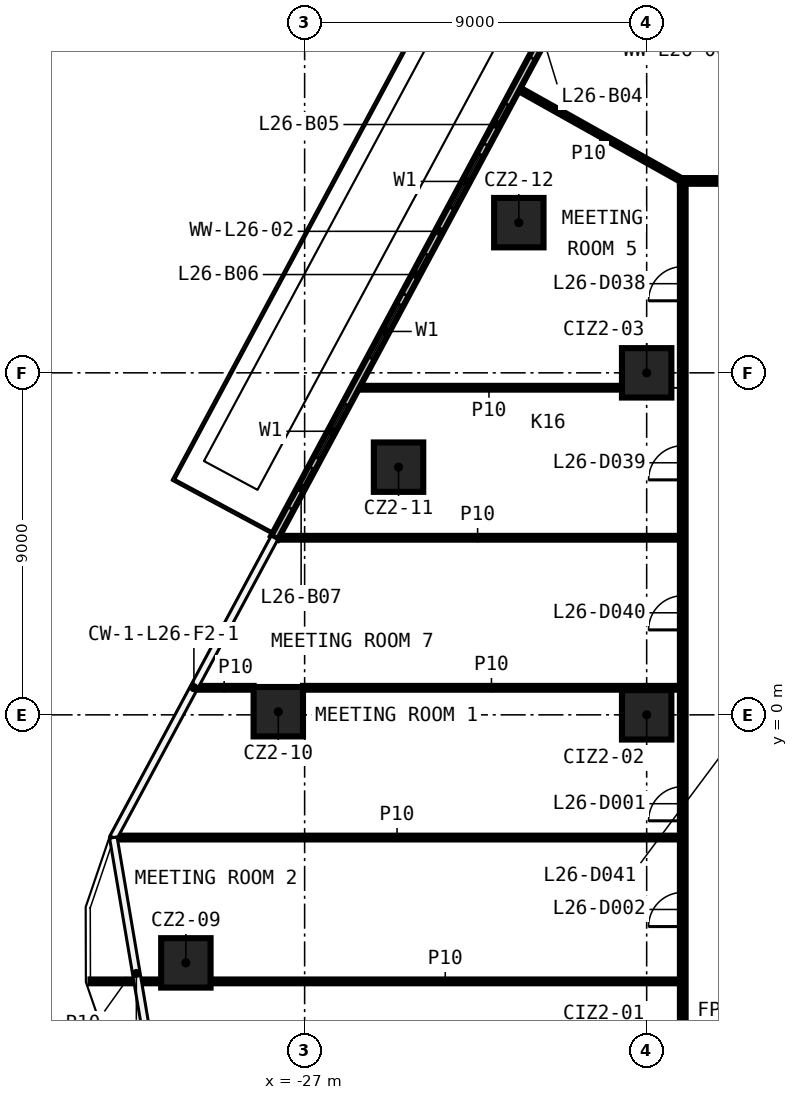
"""IFC4 building model, lengths in metres.
Left out: names, types, materials, properties, quantities, classifications, styles, units other than length and angle.
Written with IfcOpenShell. Run it as: python <this file> out.ifc"""

import sys

from ifc_helpers import new_model, si_unit, direction, frame, frame_2d, origin, origin_2d, place, context, subcontext, project, spatial, rectangle, extrude, element, fill, save


model = new_model("IFC4")
c1 = context("Model", 3, precision=1e-05, world=origin(), true_north=direction((0.0, 1.0)))
c2 = subcontext(c1, "Body", "Model", "MODEL_VIEW")
j1 = project(units=[si_unit("LENGTHUNIT", "METRE"), si_unit("PLANEANGLEUNIT", "RADIAN")], contexts=[c1])
p1 = place(None, origin())
s1 = spatial("IfcSite", under=j1, at=p1, CompositionType="ELEMENT")
p2 = place(p1, origin())
s2 = spatial("IfcBuilding", under=s1, at=p2, CompositionType="ELEMENT")
p3 = place(p2, frame((0.0, 0.0, 121.1)))
s3 = spatial("IfcBuildingStorey", under=s2, at=p3, CompositionType="ELEMENT", Elevation=121.1)
for number, where, z_axis, x_axis in (
    (1, (-30.125, -6.527, 0.0), (0.0, 0.0, 1.0), (1.0, 0.0, 0.0)),
    (2, (-27.693, 0.083, 0.0), (0.0, 0.0, 1.0), (1.0, 0.0, 0.0)),
    (3, (-24.529, 6.518, 0.0), (0.0, 0.0, 1.0), (1.0, 0.0, 0.0)),
    (4, (-21.364, 12.952, 0.0), (0.0, 0.0, 1.0), (1.0, 0.0, 0.0)),
    (5, (-18.0, 0.0, 0.0), (0.0, 0.0, 1.0), (1.0, 0.0, 0.0)),
    (6, (-18.0, 9.0, 0.0), (0.0, 0.0, 1.0), (1.0, 0.0, 0.0)),
):
    element("IfcColumn", number, at=place(p3, frame(where, z_axis=z_axis, x_axis=x_axis)), inside=s3, PredefinedType="COLUMN", context=c2, shape_type="SweptSolid", body=[
        extrude(rectangle(XDim=1.3, YDim=1.3, at=origin_2d()), origin(), (0.0, 0.0, 1.0), 3.3),
    ])
p4 = place(p3, frame((-32.635, -7.014, 0.0), z_axis=(0.0, 0.0, 1.0), x_axis=(1.0, 0.0, 0.0)))
e7 = element("IfcWall", 7, at=p4, inside=s3, PredefinedType="PARTITIONING", context=c2, shape_type="SweptSolid", body=[
    extrude(rectangle(XDim=1.86, YDim=0.1, at=frame_2d((0.93, 0.0))), origin(), (0.0, 0.0, 1.0), 3.3),
])
p5 = place(p3, frame((-29.475, -7.014, 0.0), z_axis=(0.0, 0.0, 1.0), x_axis=(1.0, 0.0, 0.0)))
e8 = element("IfcWall", 8, at=p5, inside=s3, PredefinedType="PARTITIONING", context=c2, shape_type="SweptSolid", body=[
    extrude(rectangle(XDim=12.35, YDim=0.1, at=frame_2d((6.175, 0.0))), origin(), (0.0, 0.0, 1.0), 3.3),
])
p6 = place(p3, frame((-32.011, -3.229, 0.0), z_axis=(0.0, 0.0, 1.0), x_axis=(1.0, 0.0, 0.0)))
e9 = element("IfcWall", 9, at=p6, inside=s3, PredefinedType="PARTITIONING", context=c2, shape_type="SweptSolid", body=[
    extrude(rectangle(XDim=14.886, YDim=0.1, at=frame_2d((7.443, 0.0))), origin(), (0.0, 0.0, 1.0), 3.3),
])
p7 = place(p3, frame((-29.893, 0.712, 0.0), z_axis=(0.0, 0.0, 1.0), x_axis=(1.0, 0.0, 0.0)))
e10 = element("IfcWall", 10, at=p7, inside=s3, PredefinedType="PARTITIONING", context=c2, shape_type="SweptSolid", body=[
    extrude(rectangle(XDim=1.55, YDim=0.1, at=frame_2d((0.775, 0.0))), origin(), (0.0, 0.0, 1.0), 3.3),
])
p8 = place(p3, frame((-27.043, 0.712, 0.0), z_axis=(0.0, 0.0, 1.0), x_axis=(1.0, 0.0, 0.0)))
e11 = element("IfcWall", 11, at=p8, inside=s3, PredefinedType="PARTITIONING", context=c2, shape_type="SweptSolid", body=[
    extrude(rectangle(XDim=9.918, YDim=0.1, at=frame_2d((4.959, 0.0))), origin(), (0.0, 0.0, 1.0), 3.3),
])
p9 = place(p3, frame((-27.771, 4.66, 0.0), z_axis=(0.0, 0.0, 1.0), x_axis=(1.0, 0.0, 0.0)))
e12 = element("IfcWall", 12, at=p9, inside=s3, PredefinedType="PARTITIONING", context=c2, shape_type="SweptSolid", body=[
    extrude(rectangle(XDim=10.646, YDim=0.1, at=frame_2d((5.323, 0.0))), origin(), (0.0, 0.0, 1.0), 3.3),
])
p10 = place(p3, frame((-25.649, 8.608, 0.0), z_axis=(0.0, 0.0, 1.0), x_axis=(1.0, 0.0, 0.0)))
e13 = element("IfcWall", 13, at=p10, inside=s3, PredefinedType="PARTITIONING", context=c2, shape_type="SweptSolid", body=[
    extrude(rectangle(XDim=6.999, YDim=0.1, at=frame_2d((3.5, 0.0))), origin(), (0.0, 0.0, 1.0), 3.3),
])
p11 = place(p3, frame((-17.125, 14.05, 0.0), z_axis=(0.0, 0.0, 1.0), x_axis=(1.0, 0.0, 0.0)))
e14 = element("IfcWall", 14, at=p11, inside=s3, PredefinedType="PARTITIONING", context=c2, shape_type="SweptSolid", body=[
    extrude(rectangle(XDim=34.25, YDim=0.15, at=frame_2d((17.125, 0.0))), origin(), (0.0, 0.0, 1.0), 3.3),
])
p12 = place(p11, frame((30.377, 0.0, 0.0)))
e15 = element("IfcOpeningElement", 15, at=p12, cuts=e14, PredefinedType="OPENING", context=c2, shape_type="SweptSolid", body=[
    extrude(rectangle(XDim=0.9, YDim=2.1, at=frame_2d((0.45, 1.05))), frame((0.0, 0.085, 0.0), z_axis=(0.0, -1.0, 0.0), x_axis=(1.0, 0.0, 0.0)), (0.0, 0.0, 1.0), 0.17),
])
p13 = place(p11, frame((23.321, 0.0, 0.0)))
e16 = element("IfcOpeningElement", 16, at=p13, cuts=e14, PredefinedType="OPENING", context=c2, shape_type="SweptSolid", body=[
    extrude(rectangle(XDim=1.0, YDim=2.1, at=frame_2d((0.5, 1.05))), frame((0.0, 0.085, 0.0), z_axis=(0.0, -1.0, 0.0), x_axis=(1.0, 0.0, 0.0)), (0.0, 0.0, 1.0), 0.17),
])
p14 = place(p11, frame((21.183, 0.0, 0.0)))
e17 = element("IfcOpeningElement", 17, at=p14, cuts=e14, PredefinedType="OPENING", context=c2, shape_type="SweptSolid", body=[
    extrude(rectangle(XDim=1.0, YDim=2.1, at=frame_2d((0.5, 1.05))), frame((0.0, 0.085, 0.0), z_axis=(0.0, -1.0, 0.0), x_axis=(1.0, 0.0, 0.0)), (0.0, 0.0, 1.0), 0.17),
])
p15 = place(p11, frame((14.241, 0.0, 0.0)))
e18 = element("IfcOpeningElement", 18, at=p15, cuts=e14, PredefinedType="OPENING", context=c2, shape_type="SweptSolid", body=[
    extrude(rectangle(XDim=1.0, YDim=2.1, at=frame_2d((0.5, 1.05))), frame((0.0, 0.085, 0.0), z_axis=(0.0, -1.0, 0.0), x_axis=(1.0, 0.0, 0.0)), (0.0, 0.0, 1.0), 0.17),
])
p16 = place(p11, frame((12.099, 0.0, 0.0)))
e19 = element("IfcOpeningElement", 19, at=p16, cuts=e14, PredefinedType="OPENING", context=c2, shape_type="SweptSolid", body=[
    extrude(rectangle(XDim=1.0, YDim=2.1, at=frame_2d((0.5, 1.05))), frame((0.0, 0.085, 0.0), z_axis=(0.0, -1.0, 0.0), x_axis=(1.0, 0.0, 0.0)), (0.0, 0.0, 1.0), 0.17),
])
p17 = place(p11, frame((5.161, 0.0, 0.0)))
e20 = element("IfcOpeningElement", 20, at=p17, cuts=e14, PredefinedType="OPENING", context=c2, shape_type="SweptSolid", body=[
    extrude(rectangle(XDim=1.0, YDim=2.1, at=frame_2d((0.5, 1.05))), frame((0.0, 0.085, 0.0), z_axis=(0.0, -1.0, 0.0), x_axis=(1.0, 0.0, 0.0)), (0.0, 0.0, 1.0), 0.17),
])
p18 = place(p11, frame((2.406, 0.0, 0.0)))
e21 = element("IfcOpeningElement", 21, at=p18, cuts=e14, PredefinedType="OPENING", context=c2, shape_type="SweptSolid", body=[
    extrude(rectangle(XDim=0.9, YDim=2.1, at=frame_2d((0.45, 1.05))), frame((0.0, 0.085, 0.0), z_axis=(0.0, -1.0, 0.0), x_axis=(1.0, 0.0, 0.0)), (0.0, 0.0, 1.0), 0.17),
])
p19 = place(p3, frame((-17.05, -13.975, 0.0), z_axis=(0.0, 0.0, 1.0), x_axis=(0.0, 1.0, 0.0)))
e22 = element("IfcWall", 22, at=p19, inside=s3, PredefinedType="PARTITIONING", context=c2, shape_type="SweptSolid", body=[
    extrude(rectangle(XDim=27.95, YDim=0.15, at=frame_2d((13.975, 0.0))), origin(), (0.0, 0.0, 1.0), 3.3),
])
p20 = place(p19, frame((11.186, 0.0, 0.0)))
e23 = element("IfcOpeningElement", 23, at=p20, cuts=e22, PredefinedType="OPENING", context=c2, shape_type="SweptSolid", body=[
    extrude(rectangle(XDim=0.9, YDim=2.1, at=frame_2d((0.45, 1.05))), frame((0.0, 0.085, 0.0), z_axis=(0.0, -1.0, 0.0), x_axis=(1.0, 0.0, 0.0)), (0.0, 0.0, 1.0), 0.17),
])
p21 = place(p19, frame((8.404, 0.0, 0.0)))
e24 = element("IfcOpeningElement", 24, at=p21, cuts=e22, PredefinedType="OPENING", context=c2, shape_type="SweptSolid", body=[
    extrude(rectangle(XDim=0.9, YDim=2.1, at=frame_2d((0.45, 1.05))), frame((0.0, 0.085, 0.0), z_axis=(0.0, -1.0, 0.0), x_axis=(1.0, 0.0, 0.0)), (0.0, 0.0, 1.0), 0.17),
])
p22 = place(p19, frame((1.58, 0.0, 0.0)))
e25 = element("IfcOpeningElement", 25, at=p22, cuts=e22, PredefinedType="OPENING", context=c2, shape_type="SweptSolid", body=[
    extrude(rectangle(XDim=0.9, YDim=2.1, at=frame_2d((0.45, 1.05))), frame((0.0, 0.085, 0.0), z_axis=(0.0, -1.0, 0.0), x_axis=(1.0, 0.0, 0.0)), (0.0, 0.0, 1.0), 0.17),
])
p23 = place(p19, frame((24.871, 0.0, 0.0)))
e26 = element("IfcOpeningElement", 26, at=p23, cuts=e22, PredefinedType="OPENING", context=c2, shape_type="SweptSolid", body=[
    extrude(rectangle(XDim=0.9, YDim=2.1, at=frame_2d((0.45, 1.05))), frame((0.0, 0.085, 0.0), z_axis=(0.0, -1.0, 0.0), x_axis=(1.0, 0.0, 0.0)), (0.0, 0.0, 1.0), 0.17),
])
p24 = place(p19, frame((20.159, 0.0, 0.0)))
e27 = element("IfcOpeningElement", 27, at=p24, cuts=e22, PredefinedType="OPENING", context=c2, shape_type="SweptSolid", body=[
    extrude(rectangle(XDim=0.9, YDim=2.1, at=frame_2d((0.45, 1.05))), frame((0.0, 0.085, 0.0), z_axis=(0.0, -1.0, 0.0), x_axis=(1.0, 0.0, 0.0)), (0.0, 0.0, 1.0), 0.17),
])
p25 = place(p19, frame((16.211, 0.0, 0.0)))
e28 = element("IfcOpeningElement", 28, at=p25, cuts=e22, PredefinedType="OPENING", context=c2, shape_type="SweptSolid", body=[
    extrude(rectangle(XDim=0.9, YDim=2.1, at=frame_2d((0.45, 1.05))), frame((0.0, 0.085, 0.0), z_axis=(0.0, -1.0, 0.0), x_axis=(1.0, 0.0, 0.0)), (0.0, 0.0, 1.0), 0.17),
])
p26 = place(p3, frame((-21.411, 16.494, 0.0), z_axis=(0.0, 0.0, 1.0), x_axis=(0.872342728858, -0.488894838803, 0.0)))
e29 = element("IfcWall", 29, at=p26, inside=s3, PredefinedType="PARTITIONING", context=c2, shape_type="SweptSolid", body=[
    extrude(rectangle(XDim=4.999, YDim=0.1, at=frame_2d((2.5, 0.0))), origin(), (0.0, 0.0, 1.0), 3.3),
])
p27 = place(p3, frame((-19.306, 20.451, 0.0), z_axis=(0.0, 0.0, 1.0), x_axis=(-0.473410228211, -0.880842072011, 0.0)))
e30 = element("IfcWall", 30, at=p27, inside=s3, PredefinedType="SOLIDWALL", context=c2, shape_type="SweptSolid", body=[
    extrude(rectangle(XDim=17.928, YDim=0.2, at=frame_2d((8.964, 0.0))), origin(), (0.0, 0.0, 1.0), 3.3),
])
p28 = place(p27, frame((0.5, 0.0, 0.6)))
e31 = element("IfcOpeningElement", 31, at=p28, cuts=e30, PredefinedType="OPENING", context=c2, shape_type="SweptSolid", body=[
    extrude(rectangle(XDim=1.6, YDim=2.4, at=frame_2d((0.8, 1.2))), frame((0.0, 0.11, 0.0), z_axis=(0.0, -1.0, 0.0), x_axis=(1.0, 0.0, 0.0)), (0.0, 0.0, 1.0), 0.22),
])
p29 = place(p27, frame((2.4, 0.0, 0.0)))
e32 = element("IfcOpeningElement", 32, at=p29, cuts=e30, PredefinedType="OPENING", context=c2, shape_type="SweptSolid", body=[
    extrude(rectangle(XDim=1.2, YDim=2.4, at=frame_2d((0.6, 1.2))), frame((0.0, 0.11, 0.0), z_axis=(0.0, -1.0, 0.0), x_axis=(1.0, 0.0, 0.0)), (0.0, 0.0, 1.0), 0.22),
])
p30 = place(p27, frame((6.482, 0.0, 0.6)))
e33 = element("IfcOpeningElement", 33, at=p30, cuts=e30, PredefinedType="OPENING", context=c2, shape_type="SweptSolid", body=[
    extrude(rectangle(XDim=1.6, YDim=2.4, at=frame_2d((0.8, 1.2))), frame((0.0, 0.11, 0.0), z_axis=(0.0, -1.0, 0.0), x_axis=(1.0, 0.0, 0.0)), (0.0, 0.0, 1.0), 0.22),
])
p31 = place(p27, frame((4.982, 0.0, 0.0)))
e34 = element("IfcOpeningElement", 34, at=p31, cuts=e30, PredefinedType="OPENING", context=c2, shape_type="SweptSolid", body=[
    extrude(rectangle(XDim=1.2, YDim=2.4, at=frame_2d((0.6, 1.2))), frame((0.0, 0.11, 0.0), z_axis=(0.0, -1.0, 0.0), x_axis=(1.0, 0.0, 0.0)), (0.0, 0.0, 1.0), 0.22),
])
p32 = place(p27, frame((10.964, 0.0, 0.6)))
e35 = element("IfcOpeningElement", 35, at=p32, cuts=e30, PredefinedType="OPENING", context=c2, shape_type="SweptSolid", body=[
    extrude(rectangle(XDim=1.6, YDim=2.4, at=frame_2d((0.8, 1.2))), frame((0.0, 0.11, 0.0), z_axis=(0.0, -1.0, 0.0), x_axis=(1.0, 0.0, 0.0)), (0.0, 0.0, 1.0), 0.22),
])
p33 = place(p27, frame((9.464, 0.0, 0.0)))
e36 = element("IfcOpeningElement", 36, at=p33, cuts=e30, PredefinedType="OPENING", context=c2, shape_type="SweptSolid", body=[
    extrude(rectangle(XDim=1.2, YDim=2.4, at=frame_2d((0.6, 1.2))), frame((0.0, 0.11, 0.0), z_axis=(0.0, -1.0, 0.0), x_axis=(1.0, 0.0, 0.0)), (0.0, 0.0, 1.0), 0.22),
])
p34 = place(p27, frame((13.946, 0.0, 0.6)))
e37 = element("IfcOpeningElement", 37, at=p34, cuts=e30, PredefinedType="OPENING", context=c2, shape_type="SweptSolid", body=[
    extrude(rectangle(XDim=1.6, YDim=2.4, at=frame_2d((0.8, 1.2))), frame((0.0, 0.11, 0.0), z_axis=(0.0, -1.0, 0.0), x_axis=(1.0, 0.0, 0.0)), (0.0, 0.0, 1.0), 0.22),
])
p35 = place(p27, frame((15.846, 0.0, 0.0)))
e38 = element("IfcOpeningElement", 38, at=p35, cuts=e30, PredefinedType="OPENING", context=c2, shape_type="SweptSolid", body=[
    extrude(rectangle(XDim=1.2, YDim=2.4, at=frame_2d((0.6, 1.2))), frame((0.0, 0.11, 0.0), z_axis=(0.0, -1.0, 0.0), x_axis=(1.0, 0.0, 0.0)), (0.0, 0.0, 1.0), 0.22),
])
p36 = place(p20, origin())
e39 = element("IfcDoor", 39, at=p36, inside=s3, OperationType="SINGLE_SWING_RIGHT", PredefinedType="DOOR", context=c2, shape_type="SweptSolid", body=[
    extrude(rectangle(XDim=0.9, YDim=2.1, at=frame_2d((0.45, 1.05))), frame((0.0, 0.025, 0.0), z_axis=(0.0, -1.0, 0.0), x_axis=(1.0, 0.0, 0.0)), (0.0, 0.0, 1.0), 0.05),
])
fill(e23, e39)
p37 = place(p21, origin())
e40 = element("IfcDoor", 40, at=p37, inside=s3, OperationType="SINGLE_SWING_LEFT", PredefinedType="DOOR", context=c2, shape_type="SweptSolid", body=[
    extrude(rectangle(XDim=0.9, YDim=2.1, at=frame_2d((0.45, 1.05))), frame((0.0, 0.025, 0.0), z_axis=(0.0, -1.0, 0.0), x_axis=(1.0, 0.0, 0.0)), (0.0, 0.0, 1.0), 0.05),
])
fill(e24, e40)
p38 = place(p23, origin())
e41 = element("IfcDoor", 41, at=p38, inside=s3, OperationType="SINGLE_SWING_RIGHT", PredefinedType="DOOR", context=c2, shape_type="SweptSolid", body=[
    extrude(rectangle(XDim=0.9, YDim=2.1, at=frame_2d((0.45, 1.05))), frame((0.0, 0.025, 0.0), z_axis=(0.0, -1.0, 0.0), x_axis=(1.0, 0.0, 0.0)), (0.0, 0.0, 1.0), 0.05),
])
fill(e26, e41)
p39 = place(p24, origin())
e42 = element("IfcDoor", 42, at=p39, inside=s3, OperationType="SINGLE_SWING_LEFT", PredefinedType="DOOR", context=c2, shape_type="SweptSolid", body=[
    extrude(rectangle(XDim=0.9, YDim=2.1, at=frame_2d((0.45, 1.05))), frame((0.0, 0.025, 0.0), z_axis=(0.0, -1.0, 0.0), x_axis=(1.0, 0.0, 0.0)), (0.0, 0.0, 1.0), 0.05),
])
fill(e27, e42)
p40 = place(p25, origin())
e43 = element("IfcDoor", 43, at=p40, inside=s3, OperationType="SINGLE_SWING_RIGHT", PredefinedType="DOOR", context=c2, shape_type="SweptSolid", body=[
    extrude(rectangle(XDim=0.9, YDim=2.1, at=frame_2d((0.45, 1.05))), frame((0.0, 0.025, 0.0), z_axis=(0.0, -1.0, 0.0), x_axis=(1.0, 0.0, 0.0)), (0.0, 0.0, 1.0), 0.05),
])
fill(e28, e43)
p41 = place(p29, origin())
e44 = element("IfcDoor", 44, at=p41, inside=s3, OperationType="SLIDING_TO_LEFT", PredefinedType="DOOR", context=c2, shape_type="SweptSolid", body=[
    extrude(rectangle(XDim=1.2, YDim=2.4, at=frame_2d((0.6, 1.2))), frame((0.0, 0.025, 0.0), z_axis=(0.0, -1.0, 0.0), x_axis=(1.0, 0.0, 0.0)), (0.0, 0.0, 1.0), 0.05),
])
fill(e32, e44)
p42 = place(p30, origin())
e45 = element("IfcWindow", 45, at=p42, inside=s3, PartitioningType="SINGLE_PANEL", PredefinedType="WINDOW", context=c2, shape_type="SweptSolid", body=[
    extrude(rectangle(XDim=1.6, YDim=2.4, at=frame_2d((0.8, 1.2))), frame((0.0, 0.03, 0.0), z_axis=(0.0, -1.0, 0.0), x_axis=(1.0, 0.0, 0.0)), (0.0, 0.0, 1.0), 0.06),
])
fill(e33, e45)
p43 = place(p31, origin())
e46 = element("IfcDoor", 46, at=p43, inside=s3, OperationType="SLIDING_TO_LEFT", PredefinedType="DOOR", context=c2, shape_type="SweptSolid", body=[
    extrude(rectangle(XDim=1.2, YDim=2.4, at=frame_2d((0.6, 1.2))), frame((0.0, 0.025, 0.0), z_axis=(0.0, -1.0, 0.0), x_axis=(1.0, 0.0, 0.0)), (0.0, 0.0, 1.0), 0.05),
])
fill(e34, e46)
p44 = place(p32, origin())
e47 = element("IfcWindow", 47, at=p44, inside=s3, PartitioningType="SINGLE_PANEL", PredefinedType="WINDOW", context=c2, shape_type="SweptSolid", body=[
    extrude(rectangle(XDim=1.6, YDim=2.4, at=frame_2d((0.8, 1.2))), frame((0.0, 0.03, 0.0), z_axis=(0.0, -1.0, 0.0), x_axis=(1.0, 0.0, 0.0)), (0.0, 0.0, 1.0), 0.06),
])
fill(e35, e47)
p45 = place(p33, origin())
e48 = element("IfcDoor", 48, at=p45, inside=s3, OperationType="SLIDING_TO_LEFT", PredefinedType="DOOR", context=c2, shape_type="SweptSolid", body=[
    extrude(rectangle(XDim=1.2, YDim=2.4, at=frame_2d((0.6, 1.2))), frame((0.0, 0.025, 0.0), z_axis=(0.0, -1.0, 0.0), x_axis=(1.0, 0.0, 0.0)), (0.0, 0.0, 1.0), 0.05),
])
fill(e36, e48)
p46 = place(p34, origin())
e49 = element("IfcWindow", 49, at=p46, inside=s3, PartitioningType="SINGLE_PANEL", PredefinedType="WINDOW", context=c2, shape_type="SweptSolid", body=[
    extrude(rectangle(XDim=1.6, YDim=2.4, at=frame_2d((0.8, 1.2))), frame((0.0, 0.03, 0.0), z_axis=(0.0, -1.0, 0.0), x_axis=(1.0, 0.0, 0.0)), (0.0, 0.0, 1.0), 0.06),
])
fill(e37, e49)
p47 = place(p35, origin())
e50 = element("IfcDoor", 50, at=p47, inside=s3, OperationType="SLIDING_TO_LEFT", PredefinedType="DOOR", context=c2, shape_type="SweptSolid", body=[
    extrude(rectangle(XDim=1.2, YDim=2.4, at=frame_2d((0.6, 1.2))), frame((0.0, 0.025, 0.0), z_axis=(0.0, -1.0, 0.0), x_axis=(1.0, 0.0, 0.0)), (0.0, 0.0, 1.0), 0.05),
])
fill(e38, e50)
save(model, sys.argv[1])
